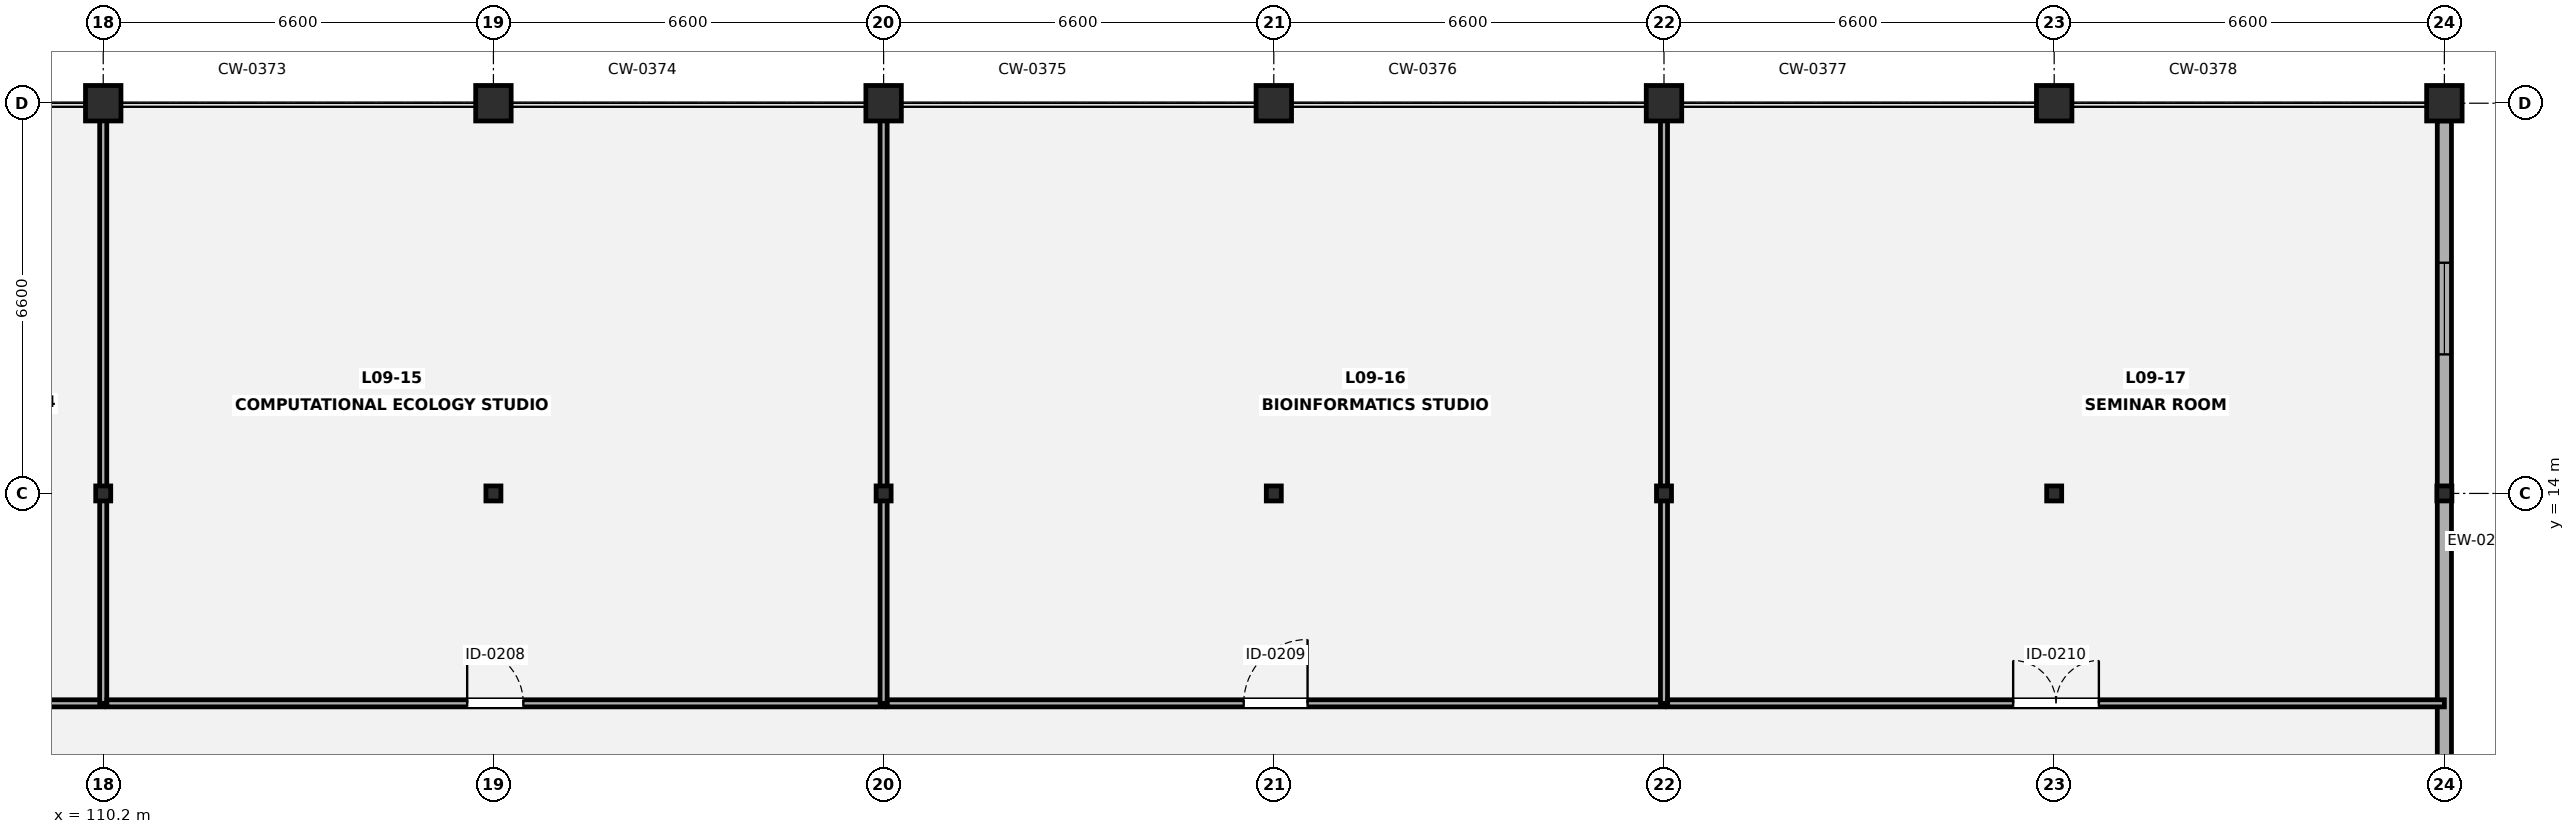
"""IFC4 building model, lengths in metres.
Left out: names, types, materials, properties, quantities, classifications, styles, units other than length and angle.
Written with IfcOpenShell. Run it as: python <this file> out.ifc"""

import sys

from ifc_helpers import new_model, si_unit, direction, frame, frame_2d, origin, origin_2d, place, context, subcontext, project, spatial, rectangle, circle, i_section, extrude, element, fill, save


model = new_model("IFC4")
c1 = context("Model", 3, precision=1e-05, world=origin(), true_north=direction((0.0, 1.0)))
c2 = subcontext(c1, "Body", "Model", "MODEL_VIEW")
j1 = project(units=[si_unit("LENGTHUNIT", "METRE"), si_unit("PLANEANGLEUNIT", "RADIAN")], contexts=[c1])
p1 = place(None, origin())
s1 = spatial("IfcSite", under=j1, at=p1, CompositionType="ELEMENT")
p2 = place(p1, origin())
s2 = spatial("IfcBuilding", under=s1, at=p2, CompositionType="ELEMENT")
p3 = place(p2, frame((0.0, 0.0, 38.15)))
s3 = spatial("IfcBuildingStorey", under=s2, at=p3, CompositionType="ELEMENT", Elevation=38.15)
p4 = place(p3, frame((110.2, 14.0, 0.0), z_axis=(0.0, 0.0, 1.0), x_axis=(1.0, 0.0, 0.0)))
e1 = element("IfcColumn", 1, at=p4, inside=s3, PredefinedType="COLUMN", context=c2, shape_type="SweptSolid", body=[
    extrude(i_section(OverallWidth=0.254, OverallDepth=0.254, WebThickness=0.009, FlangeThickness=0.014, FilletRadius=0.014, at=origin_2d()), origin(), (0.0, 0.0, 1.0), 3.85),
])
p5 = place(p3, frame((110.2, 20.6, 0.0), z_axis=(0.0, 0.0, 1.0), x_axis=(1.0, 0.0, 0.0)))
e2 = element("IfcColumn", 2, at=p5, inside=s3, PredefinedType="PILASTER", context=c2, shape_type="SweptSolid", body=[
    extrude(circle(Radius=0.3, at=origin_2d()), origin(), (0.0, 0.0, 1.0), 3.85),
])
p6 = place(p3, frame((116.8, 14.0, 0.0), z_axis=(0.0, 0.0, 1.0), x_axis=(1.0, 0.0, 0.0)))
e3 = element("IfcColumn", 3, at=p6, inside=s3, PredefinedType="COLUMN", context=c2, shape_type="SweptSolid", body=[
    extrude(i_section(OverallWidth=0.254, OverallDepth=0.254, WebThickness=0.009, FlangeThickness=0.014, FilletRadius=0.014, at=origin_2d()), origin(), (0.0, 0.0, 1.0), 3.85),
])
p7 = place(p3, frame((116.8, 20.6, 0.0), z_axis=(0.0, 0.0, 1.0), x_axis=(1.0, 0.0, 0.0)))
e4 = element("IfcColumn", 4, at=p7, inside=s3, PredefinedType="PILASTER", context=c2, shape_type="SweptSolid", body=[
    extrude(circle(Radius=0.3, at=origin_2d()), origin(), (0.0, 0.0, 1.0), 3.85),
])
p8 = place(p3, frame((123.4, 14.0, 0.0), z_axis=(0.0, 0.0, 1.0), x_axis=(1.0, 0.0, 0.0)))
e5 = element("IfcColumn", 5, at=p8, inside=s3, PredefinedType="COLUMN", context=c2, shape_type="SweptSolid", body=[
    extrude(i_section(OverallWidth=0.254, OverallDepth=0.254, WebThickness=0.009, FlangeThickness=0.014, FilletRadius=0.014, at=origin_2d()), origin(), (0.0, 0.0, 1.0), 3.85),
])
p9 = place(p3, frame((123.4, 20.6, 0.0), z_axis=(0.0, 0.0, 1.0), x_axis=(1.0, 0.0, 0.0)))
e6 = element("IfcColumn", 6, at=p9, inside=s3, PredefinedType="PILASTER", context=c2, shape_type="SweptSolid", body=[
    extrude(circle(Radius=0.3, at=origin_2d()), origin(), (0.0, 0.0, 1.0), 3.85),
])
p10 = place(p3, frame((130.0, 14.0, 0.0), z_axis=(0.0, 0.0, 1.0), x_axis=(1.0, 0.0, 0.0)))
e7 = element("IfcColumn", 7, at=p10, inside=s3, PredefinedType="COLUMN", context=c2, shape_type="SweptSolid", body=[
    extrude(i_section(OverallWidth=0.254, OverallDepth=0.254, WebThickness=0.009, FlangeThickness=0.014, FilletRadius=0.014, at=origin_2d()), origin(), (0.0, 0.0, 1.0), 3.85),
])
p11 = place(p3, frame((130.0, 20.6, 0.0), z_axis=(0.0, 0.0, 1.0), x_axis=(1.0, 0.0, 0.0)))
e8 = element("IfcColumn", 8, at=p11, inside=s3, PredefinedType="PILASTER", context=c2, shape_type="SweptSolid", body=[
    extrude(circle(Radius=0.3, at=origin_2d()), origin(), (0.0, 0.0, 1.0), 3.85),
])
p12 = place(p3, frame((136.6, 14.0, 0.0), z_axis=(0.0, 0.0, 1.0), x_axis=(1.0, 0.0, 0.0)))
e9 = element("IfcColumn", 9, at=p12, inside=s3, PredefinedType="COLUMN", context=c2, shape_type="SweptSolid", body=[
    extrude(i_section(OverallWidth=0.254, OverallDepth=0.254, WebThickness=0.009, FlangeThickness=0.014, FilletRadius=0.014, at=origin_2d()), origin(), (0.0, 0.0, 1.0), 3.85),
])
p13 = place(p3, frame((136.6, 20.6, 0.0), z_axis=(0.0, 0.0, 1.0), x_axis=(1.0, 0.0, 0.0)))
e10 = element("IfcColumn", 10, at=p13, inside=s3, PredefinedType="PILASTER", context=c2, shape_type="SweptSolid", body=[
    extrude(circle(Radius=0.3, at=origin_2d()), origin(), (0.0, 0.0, 1.0), 3.85),
])
p14 = place(p3, frame((143.2, 14.0, 0.0), z_axis=(0.0, 0.0, 1.0), x_axis=(1.0, 0.0, 0.0)))
e11 = element("IfcColumn", 11, at=p14, inside=s3, PredefinedType="COLUMN", context=c2, shape_type="SweptSolid", body=[
    extrude(i_section(OverallWidth=0.254, OverallDepth=0.254, WebThickness=0.009, FlangeThickness=0.014, FilletRadius=0.014, at=origin_2d()), origin(), (0.0, 0.0, 1.0), 3.57),
])
p15 = place(p3, frame((143.2, 20.6, 0.0), z_axis=(0.0, 0.0, 1.0), x_axis=(1.0, 0.0, 0.0)))
e12 = element("IfcColumn", 12, at=p15, inside=s3, PredefinedType="PILASTER", context=c2, shape_type="SweptSolid", body=[
    extrude(circle(Radius=0.3, at=origin_2d()), origin(), (0.0, 0.0, 1.0), 3.57),
])
p16 = place(p3, frame((149.8, 14.0, 0.0), z_axis=(0.0, 0.0, 1.0), x_axis=(1.0, 0.0, 0.0)))
e13 = element("IfcColumn", 13, at=p16, inside=s3, PredefinedType="COLUMN", context=c2, shape_type="SweptSolid", body=[
    extrude(i_section(OverallWidth=0.254, OverallDepth=0.254, WebThickness=0.009, FlangeThickness=0.014, FilletRadius=0.014, at=origin_2d()), origin(), (0.0, 0.0, 1.0), 3.57),
])
p17 = place(p3, frame((149.8, 20.6, 0.0), z_axis=(0.0, 0.0, 1.0), x_axis=(1.0, 0.0, 0.0)))
e14 = element("IfcColumn", 14, at=p17, inside=s3, PredefinedType="PILASTER", context=c2, shape_type="SweptSolid", body=[
    extrude(circle(Radius=0.3, at=origin_2d()), origin(), (0.0, 0.0, 1.0), 3.57),
])
p18 = place(p3, frame((149.8, 20.302, 0.0), z_axis=(0.0, 0.0, 1.0), x_axis=(0.0, -1.0, 0.0)))
e15 = element("IfcWall", 15, at=p18, inside=s3, PredefinedType="SOLIDWALL", context=c2, shape_type="SweptSolid", body=[
    extrude(rectangle(XDim=19.204, YDim=0.24, at=frame_2d((9.602, 0.0))), origin(), (0.0, 0.0, 1.0), 3.022),
])
p19 = place(p18, frame((2.4, 0.0, 0.85)))
e16 = element("IfcOpeningElement", 16, at=p19, cuts=e15, PredefinedType="OPENING", context=c2, shape_type="SweptSolid", body=[
    extrude(rectangle(XDim=1.55, YDim=1.4, at=frame_2d((0.775, 0.7))), frame((0.0, 0.13, 0.0), z_axis=(0.0, -1.0, 0.0), x_axis=(1.0, 0.0, 0.0)), (0.0, 0.0, 1.0), 0.26),
])
p20 = place(p18, frame((15.1, 0.0, 0.85)))
e17 = element("IfcOpeningElement", 17, at=p20, cuts=e15, PredefinedType="OPENING", context=c2, shape_type="SweptSolid", body=[
    extrude(rectangle(XDim=1.95, YDim=1.5, at=frame_2d((0.975, 0.75))), frame((0.0, 0.13, 0.0), z_axis=(0.0, -1.0, 0.0), x_axis=(1.0, 0.0, 0.0)), (0.0, 0.0, 1.0), 0.26),
])
p21 = place(p3, frame((103.6, 10.45, 0.0), z_axis=(0.0, 0.0, 1.0), x_axis=(1.0, 0.0, 0.0)))
e18 = element("IfcWall", 18, at=p21, inside=s3, PredefinedType="PARTITIONING", context=c2, shape_type="SweptSolid", body=[
    extrude(rectangle(XDim=6.6, YDim=0.12, at=frame_2d((3.3, 0.0))), origin(), (0.0, 0.0, 1.0), 3.196),
])
p22 = place(p21, frame((2.76, 0.0, 0.0)))
e19 = element("IfcOpeningElement", 19, at=p22, cuts=e18, PredefinedType="OPENING", context=c2, shape_type="SweptSolid", body=[
    extrude(rectangle(XDim=1.08, YDim=2.12, at=frame_2d((0.54, 1.06))), frame((0.0, 0.07, 0.0), z_axis=(0.0, -1.0, 0.0), x_axis=(1.0, 0.0, 0.0)), (0.0, 0.0, 1.0), 0.14),
])
p23 = place(p3, frame((110.2, 10.45, 0.0), z_axis=(0.0, 0.0, 1.0), x_axis=(0.0, 1.0, 0.0)))
e20 = element("IfcWall", 20, at=p23, inside=s3, PredefinedType="PARTITIONING", context=c2, shape_type="SweptSolid", body=[
    extrude(rectangle(XDim=10.15, YDim=0.12, at=frame_2d((5.075, 0.0))), origin(), (0.0, 0.0, 1.0), 3.022),
])
p24 = place(p3, frame((110.262, 10.45, 0.0), z_axis=(0.0, 0.0, 1.0), x_axis=(1.0, 0.0, 0.0)))
e21 = element("IfcWall", 21, at=p24, inside=s3, PredefinedType="PARTITIONING", context=c2, shape_type="SweptSolid", body=[
    extrude(rectangle(XDim=13.138, YDim=0.12, at=frame_2d((6.569, 0.0))), origin(), (0.0, 0.0, 1.0), 3.196),
])
p25 = place(p24, frame((6.094, 0.0, 0.0)))
e22 = element("IfcOpeningElement", 22, at=p25, cuts=e21, PredefinedType="OPENING", context=c2, shape_type="SweptSolid", body=[
    extrude(rectangle(XDim=0.95, YDim=2.1, at=frame_2d((0.475, 1.05))), frame((0.0, 0.07, 0.0), z_axis=(0.0, -1.0, 0.0), x_axis=(1.0, 0.0, 0.0)), (0.0, 0.0, 1.0), 0.14),
])
p26 = place(p3, frame((123.4, 10.45, 0.0), z_axis=(0.0, 0.0, 1.0), x_axis=(0.0, 1.0, 0.0)))
e23 = element("IfcWall", 23, at=p26, inside=s3, PredefinedType="PARTITIONING", context=c2, shape_type="SweptSolid", body=[
    extrude(rectangle(XDim=10.15, YDim=0.12, at=frame_2d((5.075, 0.0))), origin(), (0.0, 0.0, 1.0), 3.022),
])
p27 = place(p3, frame((123.462, 10.45, 0.0), z_axis=(0.0, 0.0, 1.0), x_axis=(1.0, 0.0, 0.0)))
e24 = element("IfcWall", 24, at=p27, inside=s3, PredefinedType="PARTITIONING", context=c2, shape_type="SweptSolid", body=[
    extrude(rectangle(XDim=13.138, YDim=0.12, at=frame_2d((6.569, 0.0))), origin(), (0.0, 0.0, 1.0), 3.196),
])
p28 = place(p27, frame((6.029, 0.0, 0.0)))
e25 = element("IfcOpeningElement", 25, at=p28, cuts=e24, PredefinedType="OPENING", context=c2, shape_type="SweptSolid", body=[
    extrude(rectangle(XDim=1.08, YDim=2.12, at=frame_2d((0.54, 1.06))), frame((0.0, 0.07, 0.0), z_axis=(0.0, -1.0, 0.0), x_axis=(1.0, 0.0, 0.0)), (0.0, 0.0, 1.0), 0.14),
])
p29 = place(p3, frame((136.6, 10.45, 0.0), z_axis=(0.0, 0.0, 1.0), x_axis=(0.0, 1.0, 0.0)))
e26 = element("IfcWall", 26, at=p29, inside=s3, PredefinedType="PARTITIONING", context=c2, shape_type="SweptSolid", body=[
    extrude(rectangle(XDim=10.15, YDim=0.12, at=frame_2d((5.075, 0.0))), origin(), (0.0, 0.0, 1.0), 3.022),
])
p30 = place(p3, frame((136.662, 10.45, 0.0), z_axis=(0.0, 0.0, 1.0), x_axis=(1.0, 0.0, 0.0)))
e27 = element("IfcWall", 27, at=p30, inside=s3, PredefinedType="PARTITIONING", context=c2, shape_type="SweptSolid", body=[
    extrude(rectangle(XDim=13.138, YDim=0.12, at=frame_2d((6.569, 0.0))), origin(), (0.0, 0.0, 1.0), 3.196),
])
p31 = place(p30, frame((5.844, 0.0, 0.0)))
e28 = element("IfcOpeningElement", 28, at=p31, cuts=e27, PredefinedType="OPENING", context=c2, shape_type="SweptSolid", body=[
    extrude(rectangle(XDim=1.45, YDim=2.12, at=frame_2d((0.725, 1.06))), frame((0.0, 0.07, 0.0), z_axis=(0.0, -1.0, 0.0), x_axis=(1.0, 0.0, 0.0)), (0.0, 0.0, 1.0), 0.14),
])
p32 = place(p19, origin())
e29 = element("IfcWindow", 29, at=p32, inside=s3, PartitioningType="SINGLE_PANEL", PredefinedType="WINDOW", context=c2, shape_type="SweptSolid", body=[
    extrude(rectangle(XDim=1.55, YDim=1.4, at=frame_2d((0.775, 0.7))), frame((0.0, 0.03, 0.0), z_axis=(0.0, -1.0, 0.0), x_axis=(1.0, 0.0, 0.0)), (0.0, 0.0, 1.0), 0.06),
])
fill(e16, e29)
p33 = place(p25, origin())
e30 = element("IfcDoor", 30, at=p33, inside=s3, OperationType="SINGLE_SWING_LEFT", PredefinedType="DOOR", context=c2, shape_type="SweptSolid", body=[
    extrude(rectangle(XDim=0.95, YDim=2.1, at=frame_2d((0.475, 1.05))), frame((0.0, 0.025, 0.0), z_axis=(0.0, -1.0, 0.0), x_axis=(1.0, 0.0, 0.0)), (0.0, 0.0, 1.0), 0.05),
])
fill(e22, e30)
p34 = place(p28, origin())
e31 = element("IfcDoor", 31, at=p34, inside=s3, OperationType="SINGLE_SWING_RIGHT", PredefinedType="DOOR", context=c2, shape_type="SweptSolid", body=[
    extrude(rectangle(XDim=1.08, YDim=2.12, at=frame_2d((0.54, 1.06))), frame((0.0, 0.025, 0.0), z_axis=(0.0, -1.0, 0.0), x_axis=(1.0, 0.0, 0.0)), (0.0, 0.0, 1.0), 0.05),
])
fill(e25, e31)
p35 = place(p31, origin())
e32 = element("IfcDoor", 32, at=p35, inside=s3, OperationType="DOUBLE_DOOR_SINGLE_SWING", PredefinedType="DOOR", context=c2, shape_type="SweptSolid", body=[
    extrude(rectangle(XDim=1.45, YDim=2.12, at=frame_2d((0.725, 1.06))), frame((0.0, 0.025, 0.0), z_axis=(0.0, -1.0, 0.0), x_axis=(1.0, 0.0, 0.0)), (0.0, 0.0, 1.0), 0.05),
])
fill(e28, e32)
save(model, sys.argv[1])
